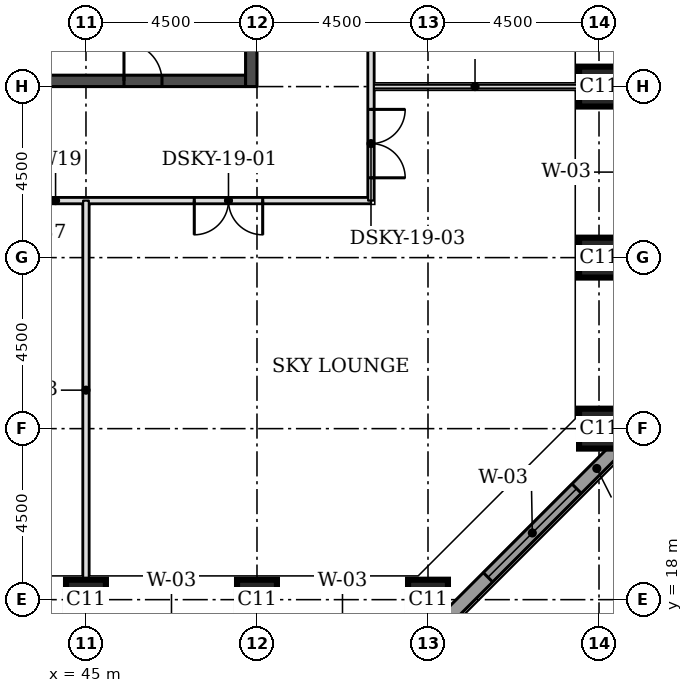
"""IFC4 building model, lengths in metres.
Left out: names, types, materials, properties, quantities, classifications, styles, units other than length and angle.
Written with IfcOpenShell. Run it as: python <this file> out.ifc"""

import sys

from ifc_helpers import new_model, si_unit, direction, frame, frame_2d, origin, origin_2d, place, context, subcontext, project, spatial, rectangle, extrude, element, fill, save


model = new_model("IFC4")
c1 = context("Model", 3, precision=1e-05, world=origin(), true_north=direction((0.0, 1.0)))
c2 = subcontext(c1, "Body", "Model", "MODEL_VIEW")
j1 = project(units=[si_unit("LENGTHUNIT", "METRE"), si_unit("PLANEANGLEUNIT", "RADIAN")], contexts=[c1])
p1 = place(None, origin())
s1 = spatial("IfcSite", under=j1, at=p1, CompositionType="ELEMENT")
p2 = place(p1, origin())
s2 = spatial("IfcBuilding", under=s1, at=p2, CompositionType="ELEMENT")
p3 = place(p2, frame((0.0, 0.0, 74.3)))
s3 = spatial("IfcBuildingStorey", under=s2, at=p3, CompositionType="ELEMENT", Elevation=74.3)
for number, where, z_axis, x_axis in (
    (1, (45.0, 18.0, 0.0), (0.0, 0.0, 1.0), (1.0, 0.0, 0.0)),
    (2, (49.5, 18.0, 0.0), (0.0, 0.0, 1.0), (1.0, 0.0, 0.0)),
    (3, (54.0, 18.0, 0.0), (0.0, 0.0, 1.0), (1.0, 0.0, 0.0)),
    (4, (58.5, 22.5, 0.0), (0.0, 0.0, 1.0), (1.0, 0.0, 0.0)),
    (5, (58.5, 27.0, 0.0), (0.0, 0.0, 1.0), (1.0, 0.0, 0.0)),
    (6, (58.5, 31.5, 0.0), (0.0, 0.0, 1.0), (1.0, 0.0, 0.0)),
):
    element("IfcColumn", number, at=place(p3, frame(where, z_axis=z_axis, x_axis=x_axis)), inside=s3, PredefinedType="COLUMN", context=c2, shape_type="SweptSolid", body=[
        extrude(rectangle(XDim=1.05, YDim=1.05, at=origin_2d()), origin(), (0.0, 0.0, 1.0), 4.6),
    ])
p4 = place(p3, frame((40.8, 31.65, 0.0), z_axis=(0.0, 0.0, 1.0), x_axis=(1.0, 0.0, 0.0)))
e7 = element("IfcWall", 7, at=p4, inside=s3, PredefinedType="SHEAR", context=c2, shape_type="SweptSolid", body=[
    extrude(rectangle(XDim=8.4, YDim=0.3, at=frame_2d((4.2, 0.0))), origin(), (0.0, 0.0, 1.0), 4.6),
])
p5 = place(p4, frame((5.2, 0.0, 0.0)))
e8 = element("IfcOpeningElement", 8, at=p5, cuts=e7, PredefinedType="OPENING", context=c2, shape_type="SweptSolid", body=[
    extrude(rectangle(XDim=1.0, YDim=2.1, at=frame_2d((0.5, 1.05))), frame((0.0, 0.16, 0.0), z_axis=(0.0, -1.0, 0.0), x_axis=(1.0, 0.0, 0.0)), (0.0, 0.0, 1.0), 0.32),
])
p6 = place(p3, frame((49.35, 31.5, 0.0), z_axis=(0.0, 0.0, 1.0), x_axis=(0.0, 1.0, 0.0)))
e9 = element("IfcWall", 9, at=p6, inside=s3, PredefinedType="SHEAR", context=c2, shape_type="SweptSolid", body=[
    extrude(rectangle(XDim=9.0, YDim=0.3, at=frame_2d((4.5, 0.0))), origin(), (0.0, 0.0, 1.0), 4.6),
])
p7 = place(p3, frame((54.239, 17.249, 0.0), z_axis=(0.0, 0.0, 1.0), x_axis=(0.707106781187, 0.707106781187, 0.0)))
e10 = element("IfcWall", 10, at=p7, inside=s3, PredefinedType="STANDARD", context=c2, shape_type="SweptSolid", body=[
    extrude(rectangle(XDim=7.089, YDim=0.35, at=frame_2d((3.544, 0.0))), origin(), (0.0, 0.0, 1.0), 4.425),
])
p8 = place(p7, frame((1.894, 0.0, 0.9)))
e11 = element("IfcOpeningElement", 11, at=p8, cuts=e10, PredefinedType="OPENING", context=c2, shape_type="SweptSolid", body=[
    extrude(rectangle(XDim=3.3, YDim=2.7, at=frame_2d((1.65, 1.35))), frame((0.0, 0.185, 0.0), z_axis=(0.0, -1.0, 0.0), x_axis=(1.0, 0.0, 0.0)), (0.0, 0.0, 1.0), 0.37),
])
p9 = place(p3, frame((52.5, 31.5, 0.0), z_axis=(0.0, 0.0, 1.0), x_axis=(1.0, 0.0, 0.0)))
e12 = element("IfcWall", 12, at=p9, inside=s3, PredefinedType="PARTITIONING", context=c2, shape_type="SweptSolid", body=[
    extrude(rectangle(XDim=5.475, YDim=0.1, at=frame_2d((2.738, 0.0))), origin(), (0.0, 0.0, 1.0), 3.45),
])
p10 = place(p3, frame((37.5, 28.5, 0.0), z_axis=(0.0, 0.0, 1.0), x_axis=(1.0, 0.0, 0.0)))
e13 = element("IfcWall", 13, at=p10, inside=s3, PredefinedType="PARTITIONING", context=c2, shape_type="SweptSolid", body=[
    extrude(rectangle(XDim=15.0, YDim=0.15, at=frame_2d((7.5, 0.0))), origin(), (0.0, 0.0, 1.0), 4.45),
])
p11 = place(p10, frame((10.35, 0.0, 0.0)))
e14 = element("IfcOpeningElement", 14, at=p11, cuts=e13, PredefinedType="OPENING", context=c2, shape_type="SweptSolid", body=[
    extrude(rectangle(XDim=1.8, YDim=2.4, at=frame_2d((0.9, 1.2))), frame((0.0, 0.085, 0.0), z_axis=(0.0, -1.0, 0.0), x_axis=(1.0, 0.0, 0.0)), (0.0, 0.0, 1.0), 0.17),
])
p12 = place(p3, frame((52.5, 28.5, 0.0), z_axis=(0.0, 0.0, 1.0), x_axis=(0.0, 1.0, 0.0)))
e15 = element("IfcWall", 15, at=p12, inside=s3, PredefinedType="PARTITIONING", context=c2, shape_type="SweptSolid", body=[
    extrude(rectangle(XDim=15.0, YDim=0.15, at=frame_2d((7.5, 0.0))), origin(), (0.0, 0.0, 1.0), 4.45),
])
p13 = place(p12, frame((0.6, 0.0, 0.0)))
e16 = element("IfcOpeningElement", 16, at=p13, cuts=e15, PredefinedType="OPENING", context=c2, shape_type="SweptSolid", body=[
    extrude(rectangle(XDim=1.8, YDim=2.4, at=frame_2d((0.9, 1.2))), frame((0.0, 0.085, 0.0), z_axis=(0.0, -1.0, 0.0), x_axis=(1.0, 0.0, 0.0)), (0.0, 0.0, 1.0), 0.17),
])
p14 = place(p12, frame((7.05, 0.0, 0.0)))
e17 = element("IfcOpeningElement", 17, at=p14, cuts=e15, PredefinedType="OPENING", context=c2, shape_type="SweptSolid", body=[
    extrude(rectangle(XDim=0.9, YDim=2.1, at=frame_2d((0.45, 1.05))), frame((0.0, 0.085, 0.0), z_axis=(0.0, -1.0, 0.0), x_axis=(1.0, 0.0, 0.0)), (0.0, 0.0, 1.0), 0.17),
])
p15 = place(p3, frame((45.0, 18.525, 0.0), z_axis=(0.0, 0.0, 1.0), x_axis=(0.0, 1.0, 0.0)))
e18 = element("IfcWall", 18, at=p15, inside=s3, PredefinedType="PARTITIONING", context=c2, shape_type="SweptSolid", body=[
    extrude(rectangle(XDim=9.975, YDim=0.15, at=frame_2d((4.988, 0.0))), origin(), (0.0, 0.0, 1.0), 4.45),
])
p16 = place(p8, origin())
e19 = element("IfcWindow", 19, at=p16, inside=s3, PartitioningType="SINGLE_PANEL", PredefinedType="WINDOW", context=c2, shape_type="SweptSolid", body=[
    extrude(rectangle(XDim=3.3, YDim=2.7, at=frame_2d((1.65, 1.35))), frame((0.0, 0.085, 0.0), z_axis=(0.0, -1.0, 0.0), x_axis=(1.0, 0.0, 0.0)), (0.0, 0.0, 1.0), 0.06),
])
fill(e11, e19)
p17 = place(p11, frame((1.8, 0.0, 0.0), z_axis=(0.0, 0.0, 1.0), x_axis=(-1.0, 0.0, 0.0)))
e20 = element("IfcDoor", 20, at=p17, inside=s3, OperationType="DOUBLE_DOOR_SINGLE_SWING", PredefinedType="DOOR", context=c2, shape_type="SweptSolid", body=[
    extrude(rectangle(XDim=1.8, YDim=2.4, at=frame_2d((0.9, 1.2))), frame((0.0, 0.025, 0.0), z_axis=(0.0, -1.0, 0.0), x_axis=(1.0, 0.0, 0.0)), (0.0, 0.0, 1.0), 0.05),
])
fill(e14, e20)
p18 = place(p13, frame((1.8, 0.0, 0.0), z_axis=(0.0, 0.0, 1.0), x_axis=(-1.0, 0.0, 0.0)))
e21 = element("IfcDoor", 21, at=p18, inside=s3, OperationType="DOUBLE_DOOR_SINGLE_SWING", PredefinedType="DOOR", context=c2, shape_type="SweptSolid", body=[
    extrude(rectangle(XDim=1.8, YDim=2.4, at=frame_2d((0.9, 1.2))), frame((0.0, 0.025, 0.0), z_axis=(0.0, -1.0, 0.0), x_axis=(1.0, 0.0, 0.0)), (0.0, 0.0, 1.0), 0.05),
])
fill(e16, e21)
p19 = place(p5, origin())
e22 = element("IfcDoor", 22, at=p19, inside=s3, OperationType="SINGLE_SWING_LEFT", PredefinedType="DOOR", context=c2, shape_type="SweptSolid", body=[
    extrude(rectangle(XDim=1.0, YDim=2.1, at=frame_2d((0.5, 1.05))), frame((0.0, 0.025, 0.0), z_axis=(0.0, -1.0, 0.0), x_axis=(1.0, 0.0, 0.0)), (0.0, 0.0, 1.0), 0.05),
])
fill(e8, e22)
save(model, sys.argv[1])
